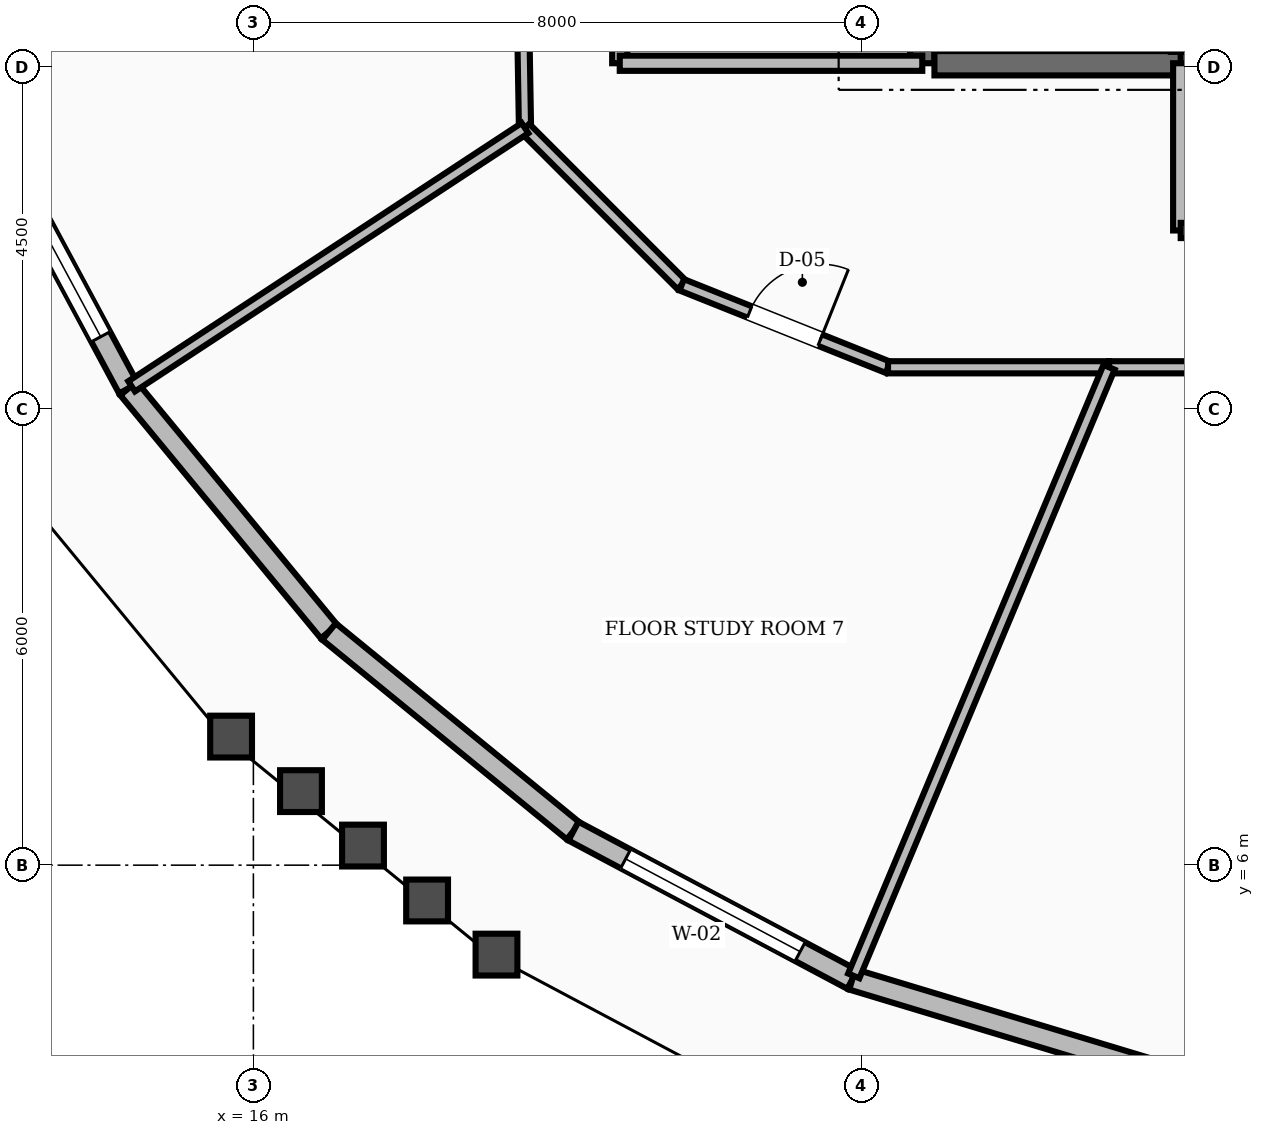
"""IFC4 building model, lengths in metres.
Left out: names, types, materials, properties, quantities, classifications, styles, units other than length and angle.
Written with IfcOpenShell. Run it as: python <this file> out.ifc"""

import sys

from ifc_helpers import new_model, si_unit, direction, frame, frame_2d, origin, place, context, subcontext, project, spatial, rectangle, extrude, element, fill, save


model = new_model("IFC4")
c1 = context("Model", 3, precision=1e-05, world=origin(), true_north=direction((0.0, 1.0)))
c2 = subcontext(c1, "Body", "Model", "MODEL_VIEW")
j1 = project(units=[si_unit("LENGTHUNIT", "METRE"), si_unit("PLANEANGLEUNIT", "RADIAN")], contexts=[c1])
p1 = place(None, origin())
s1 = spatial("IfcSite", under=j1, at=p1, CompositionType="ELEMENT")
p2 = place(p1, origin())
s2 = spatial("IfcBuilding", under=s1, at=p2, CompositionType="ELEMENT")
p3 = place(p2, frame((0.0, 0.0, 247.2)))
s3 = spatial("IfcBuildingStorey", under=s2, at=p3, CompositionType="ELEMENT", Elevation=247.2)
p4 = place(p3, frame((24.8, 16.55, 0.0), z_axis=(0.0, 0.0, 1.0), x_axis=(0.0, 1.0, 0.0)))
e1 = element("IfcWall", 1, at=p4, inside=s3, PredefinedType="SHEAR", context=c2, shape_type="SweptSolid", body=[
    extrude(rectangle(XDim=6.3, YDim=0.32, at=frame_2d((3.15, 0.0))), origin(), (0.0, 0.0, 1.0), 3.6),
])
p5 = place(p3, frame((24.96, 16.55, 0.0), z_axis=(0.0, 0.0, 1.0), x_axis=(1.0, 0.0, 0.0)))
e2 = element("IfcWall", 2, at=p5, inside=s3, PredefinedType="SHEAR", context=c2, shape_type="SweptSolid", body=[
    extrude(rectangle(XDim=3.24, YDim=0.32, at=frame_2d((1.62, 0.0))), origin(), (0.0, 0.0, 1.0), 3.6),
])
p6 = place(p3, frame((12.396, 15.922, 0.0), z_axis=(0.0, 0.0, 1.0), x_axis=(0.473326520675, -0.880887055658, 0.0)))
e3 = element("IfcWall", 3, at=p6, inside=s3, PredefinedType="STANDARD", context=c2, shape_type="SweptSolid", body=[
    extrude(rectangle(XDim=4.143, YDim=0.28, at=frame_2d((2.071, 0.0))), origin(), (0.0, 0.0, 1.0), 2.88),
])
p7 = place(p6, frame((0.771, 0.0, 0.8)))
e4 = element("IfcOpeningElement", 4, at=p7, cuts=e3, PredefinedType="OPENING", context=c2, shape_type="SweptSolid", body=[
    extrude(rectangle(XDim=2.6, YDim=1.65, at=frame_2d((1.3, 0.825))), frame((0.0, 0.15, 0.0), z_axis=(0.0, -1.0, 0.0), x_axis=(1.0, 0.0, 0.0)), (0.0, 0.0, 1.0), 0.3),
])
p8 = place(p3, frame((14.356, 12.272, 0.0), z_axis=(0.0, 0.0, 1.0), x_axis=(0.63634880002, -0.771401454959, 0.0)))
e5 = element("IfcWall", 5, at=p8, inside=s3, PredefinedType="STANDARD", context=c2, shape_type="SweptSolid", body=[
    extrude(rectangle(XDim=4.147, YDim=0.28, at=frame_2d((2.073, 0.0))), origin(), (0.0, 0.0, 1.0), 2.88),
])
p9 = place(p3, frame((16.995, 9.073, 0.0), z_axis=(0.0, 0.0, 1.0), x_axis=(0.774627683951, -0.632417545025, 0.0)))
e6 = element("IfcWall", 6, at=p9, inside=s3, PredefinedType="STANDARD", context=c2, shape_type="SweptSolid", body=[
    extrude(rectangle(XDim=4.151, YDim=0.28, at=frame_2d((2.076, 0.0))), origin(), (0.0, 0.0, 1.0), 2.88),
])
p10 = place(p3, frame((20.211, 6.448, 0.0), z_axis=(0.0, 0.0, 1.0), x_axis=(0.88293458377, -0.469496028506, 0.0)))
e7 = element("IfcWall", 7, at=p10, inside=s3, PredefinedType="STANDARD", context=c2, shape_type="SweptSolid", body=[
    extrude(rectangle(XDim=4.155, YDim=0.28, at=frame_2d((2.077, 0.0))), origin(), (0.0, 0.0, 1.0), 2.88),
])
p11 = place(p10, frame((0.778, 0.0, 0.8)))
e8 = element("IfcOpeningElement", 8, at=p11, cuts=e7, PredefinedType="OPENING", context=c2, shape_type="SweptSolid", body=[
    extrude(rectangle(XDim=2.6, YDim=1.65, at=frame_2d((1.3, 0.825))), frame((0.0, 0.15, 0.0), z_axis=(0.0, -1.0, 0.0), x_axis=(1.0, 0.0, 0.0)), (0.0, 0.0, 1.0), 0.3),
])
p12 = place(p3, frame((23.879, 4.497, 0.0), z_axis=(0.0, 0.0, 1.0), x_axis=(0.957348244256, -0.288936566083, 0.0)))
e9 = element("IfcWall", 9, at=p12, inside=s3, PredefinedType="STANDARD", context=c2, shape_type="SweptSolid", body=[
    extrude(rectangle(XDim=4.158, YDim=0.28, at=frame_2d((2.079, 0.0))), origin(), (0.0, 0.0, 1.0), 2.88),
])
p13 = place(p3, frame((20.82, 16.55, 0.0), z_axis=(0.0, 0.0, 1.0), x_axis=(0.0, 1.0, 0.0)))
e10 = element("IfcWall", 10, at=p13, inside=s3, PredefinedType="SOLIDWALL", context=c2, shape_type="SweptSolid", body=[
    extrude(rectangle(XDim=2.73, YDim=0.2, at=frame_2d((1.365, 0.0))), origin(), (0.0, 0.0, 1.0), 2.87),
])
p14 = place(p13, frame((0.815, 0.0, 0.0)))
e11 = element("IfcOpeningElement", 11, at=p14, cuts=e10, PredefinedType="OPENING", context=c2, shape_type="SweptSolid", body=[
    extrude(rectangle(XDim=1.1, YDim=2.1, at=frame_2d((0.55, 1.05))), frame((0.0, 0.11, 0.0), z_axis=(0.0, -1.0, 0.0), x_axis=(1.0, 0.0, 0.0)), (0.0, 0.0, 1.0), 0.22),
])
p15 = place(p3, frame((20.82, 16.55, 0.0), z_axis=(0.0, 0.0, 1.0), x_axis=(1.0, 0.0, 0.0)))
e12 = element("IfcWall", 12, at=p15, inside=s3, PredefinedType="SOLIDWALL", context=c2, shape_type="SweptSolid", body=[
    extrude(rectangle(XDim=3.98, YDim=0.2, at=frame_2d((1.99, 0.0))), origin(), (0.0, 0.0, 1.0), 2.87),
])
p16 = place(p3, frame((28.2, 14.35, 0.0), z_axis=(0.0, 0.0, 1.0), x_axis=(0.0, 1.0, 0.0)))
e13 = element("IfcWall", 13, at=p16, inside=s3, PredefinedType="SOLIDWALL", context=c2, shape_type="SweptSolid", body=[
    extrude(rectangle(XDim=2.2, YDim=0.2, at=frame_2d((1.1, 0.0))), origin(), (0.0, 0.0, 1.0), 2.87),
])
p17 = place(p3, frame((28.2, 14.35, 0.0), z_axis=(0.0, 0.0, 1.0), x_axis=(1.0, 0.0, 0.0)))
e14 = element("IfcWall", 14, at=p17, inside=s3, PredefinedType="SOLIDWALL", context=c2, shape_type="SweptSolid", body=[
    extrude(rectangle(XDim=7.6, YDim=0.2, at=frame_2d((3.8, 0.0))), origin(), (0.0, 0.0, 1.0), 2.87),
])
p18 = place(p17, frame((3.2, 0.0, 0.0)))
e15 = element("IfcOpeningElement", 15, at=p18, cuts=e14, PredefinedType="OPENING", context=c2, shape_type="SweptSolid", body=[
    extrude(rectangle(XDim=1.2, YDim=2.1, at=frame_2d((0.6, 1.05))), frame((0.0, 0.11, 0.0), z_axis=(0.0, -1.0, 0.0), x_axis=(1.0, 0.0, 0.0)), (0.0, 0.0, 1.0), 0.22),
])
p19 = place(p3, frame((19.52, 18.831, 0.0), z_axis=(0.0, 0.0, 1.0), x_axis=(0.016981035134, -0.999855811828, 0.0)))
e16 = element("IfcWall", 16, at=p19, inside=s3, PredefinedType="SOLIDWALL", context=c2, shape_type="SweptSolid", body=[
    extrude(rectangle(XDim=3.134, YDim=0.16, at=frame_2d((1.567, 0.0))), origin(), (0.0, 0.0, 1.0), 2.87),
])
p20 = place(p3, frame((19.573, 15.697, 0.0), z_axis=(0.0, 0.0, 1.0), x_axis=(0.707106781187, -0.707106781187, 0.0)))
e17 = element("IfcWall", 17, at=p20, inside=s3, PredefinedType="SOLIDWALL", context=c2, shape_type="SweptSolid", body=[
    extrude(rectangle(XDim=2.916, YDim=0.16, at=frame_2d((1.458, 0.0))), origin(), (0.0, 0.0, 1.0), 2.87),
])
p21 = place(p3, frame((21.635, 13.635, 0.0), z_axis=(0.0, 0.0, 1.0), x_axis=(0.92856882165, -0.371160266542, 0.0)))
e18 = element("IfcWall", 18, at=p21, inside=s3, PredefinedType="SOLIDWALL", context=c2, shape_type="SweptSolid", body=[
    extrude(rectangle(XDim=2.923, YDim=0.16, at=frame_2d((1.461, 0.0))), origin(), (0.0, 0.0, 1.0), 2.87),
])
p22 = place(p21, frame((0.962, 0.0, 0.0)))
e19 = element("IfcOpeningElement", 19, at=p22, cuts=e18, PredefinedType="OPENING", context=c2, shape_type="SweptSolid", body=[
    extrude(rectangle(XDim=1.0, YDim=2.1, at=frame_2d((0.5, 1.05))), frame((0.0, 0.09, 0.0), z_axis=(0.0, -1.0, 0.0), x_axis=(1.0, 0.0, 0.0)), (0.0, 0.0, 1.0), 0.18),
])
p23 = place(p3, frame((24.349, 12.55, 0.0), z_axis=(0.0, 0.0, 1.0), x_axis=(1.0, 0.0, 0.0)))
e20 = element("IfcWall", 20, at=p23, inside=s3, PredefinedType="SOLIDWALL", context=c2, shape_type="SweptSolid", body=[
    extrude(rectangle(XDim=2.908, YDim=0.16, at=frame_2d((1.454, 0.0))), origin(), (0.0, 0.0, 1.0), 2.87),
])
p24 = place(p3, frame((27.257, 12.55, 0.0), z_axis=(0.0, 0.0, 1.0), x_axis=(1.0, 0.0, 0.0)))
e21 = element("IfcWall", 21, at=p24, inside=s3, PredefinedType="SOLIDWALL", context=c2, shape_type="SweptSolid", body=[
    extrude(rectangle(XDim=2.465, YDim=0.16, at=frame_2d((1.232, 0.0))), origin(), (0.0, 0.0, 1.0), 2.87),
])
p25 = place(p3, frame((19.573, 15.697, 0.0), z_axis=(0.0, 0.0, 1.0), x_axis=(-0.835967060614, -0.548779622043, 0.0)))
e22 = element("IfcWall", 22, at=p25, inside=s3, PredefinedType="SOLIDWALL", context=c2, shape_type="SweptSolid", body=[
    extrude(rectangle(XDim=6.19, YDim=0.16, at=frame_2d((3.095, 0.0))), origin(), (0.0, 0.0, 1.0), 2.87),
])
p26 = place(p3, frame((27.257, 12.55, 0.0), z_axis=(0.0, 0.0, 1.0), x_axis=(-0.386818468204, -0.922155883057, 0.0)))
e23 = element("IfcWall", 23, at=p26, inside=s3, PredefinedType="SOLIDWALL", context=c2, shape_type="SweptSolid", body=[
    extrude(rectangle(XDim=8.683, YDim=0.16, at=frame_2d((4.341, 0.0))), origin(), (0.0, 0.0, 1.0), 2.87),
])
p27 = place(p7, origin())
e24 = element("IfcWindow", 24, at=p27, inside=s3, PartitioningType="SINGLE_PANEL", PredefinedType="WINDOW", context=c2, shape_type="SweptSolid", body=[
    extrude(rectangle(XDim=2.6, YDim=1.65, at=frame_2d((1.3, 0.825))), frame((0.0, 0.03, 0.0), z_axis=(0.0, -1.0, 0.0), x_axis=(1.0, 0.0, 0.0)), (0.0, 0.0, 1.0), 0.06),
])
fill(e4, e24)
p28 = place(p11, origin())
e25 = element("IfcWindow", 25, at=p28, inside=s3, PartitioningType="SINGLE_PANEL", PredefinedType="WINDOW", context=c2, shape_type="SweptSolid", body=[
    extrude(rectangle(XDim=2.6, YDim=1.65, at=frame_2d((1.3, 0.825))), frame((0.0, 0.03, 0.0), z_axis=(0.0, -1.0, 0.0), x_axis=(1.0, 0.0, 0.0)), (0.0, 0.0, 1.0), 0.06),
])
fill(e8, e25)
p29 = place(p22, origin())
e26 = element("IfcDoor", 26, at=p29, inside=s3, OperationType="SINGLE_SWING_RIGHT", PredefinedType="DOOR", context=c2, shape_type="SweptSolid", body=[
    extrude(rectangle(XDim=1.0, YDim=2.1, at=frame_2d((0.5, 1.05))), frame((0.0, 0.025, 0.0), z_axis=(0.0, -1.0, 0.0), x_axis=(1.0, 0.0, 0.0)), (0.0, 0.0, 1.0), 0.05),
])
fill(e19, e26)
save(model, sys.argv[1])
